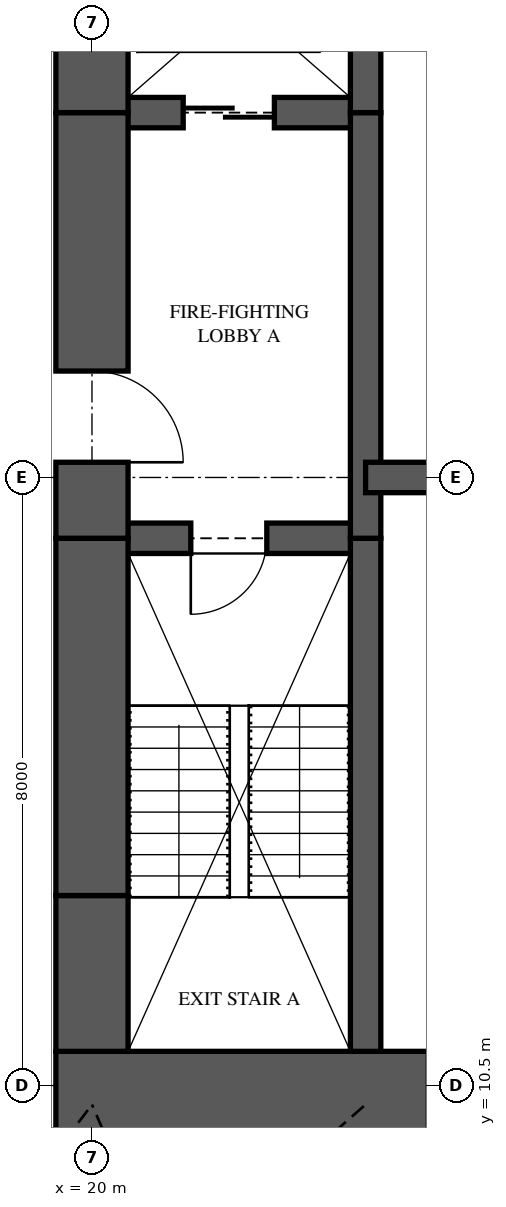
"""IFC4 building model, lengths in metres.
Left out: names, types, materials, properties, quantities, classifications, styles, units other than length and angle.
Written with IfcOpenShell. Run it as: python <this file> out.ifc"""

import sys

from ifc_helpers import new_model, si_unit, direction, frame, frame_2d, origin, place, context, subcontext, project, spatial, rectangle, extrude, element, fill, save


model = new_model("IFC4")
c1 = context("Model", 3, precision=1e-05, world=origin(), true_north=direction((0.0, 1.0)))
c2 = subcontext(c1, "Body", "Model", "MODEL_VIEW")
j1 = project(units=[si_unit("LENGTHUNIT", "METRE"), si_unit("PLANEANGLEUNIT", "RADIAN")], contexts=[c1])
p1 = place(None, origin())
s1 = spatial("IfcSite", under=j1, at=p1, CompositionType="ELEMENT")
p2 = place(p1, origin())
s2 = spatial("IfcBuilding", under=s1, at=p2, CompositionType="ELEMENT")
p3 = place(p2, frame((0.0, 0.0, 71.25)))
s3 = spatial("IfcBuildingStorey", under=s2, at=p3, CompositionType="ELEMENT", Elevation=71.25)
p4 = place(p3, frame((19.525, 10.125, 0.0), z_axis=(0.0, 0.0, 1.0), x_axis=(1.0, 0.0, 0.0)))
e1 = element("IfcWall", 1, at=p4, inside=s3, PredefinedType="SHEAR", context=c2, shape_type="SweptSolid", body=[
    extrude(rectangle(XDim=6.475, YDim=1.65, at=frame_2d((3.238, 0.0))), origin(), (0.0, 0.0, 1.0), 3.5),
])
p5 = place(p4, frame((4.9, 0.0, 0.0)))
e2 = element("IfcOpeningElement", 2, at=p5, cuts=e1, PredefinedType="OPENING", context=c2, shape_type="SweptSolid", body=[
    extrude(rectangle(XDim=0.75, YDim=2.1, at=frame_2d((0.375, 1.05))), frame((0.0, 0.835, 0.0), z_axis=(0.0, -1.0, 0.0), x_axis=(1.0, 0.0, 0.0)), (0.0, 0.0, 1.0), 1.67),
])
p6 = place(p3, frame((20.0, 26.05, 0.0), z_axis=(0.0, 0.0, 1.0), x_axis=(0.0, -1.0, 0.0)))
e3 = element("IfcWall", 3, at=p6, inside=s3, PredefinedType="SHEAR", context=c2, shape_type="SweptSolid", body=[
    extrude(rectangle(XDim=2.75, YDim=0.95, at=frame_2d((1.375, 0.0))), origin(), (0.0, 0.0, 1.0), 3.5),
])
p7 = place(p3, frame((20.0, 23.3, 0.0), z_axis=(0.0, 0.0, 1.0), x_axis=(0.0, -1.0, 0.0)))
e4 = element("IfcWall", 4, at=p7, inside=s3, PredefinedType="SHEAR", context=c2, shape_type="SweptSolid", body=[
    extrude(rectangle(XDim=5.6, YDim=0.95, at=frame_2d((2.8, 0.0))), origin(), (0.0, 0.0, 1.0), 3.5),
])
p8 = place(p7, frame((3.4, 0.0, 0.0)))
e5 = element("IfcOpeningElement", 5, at=p8, cuts=e4, PredefinedType="OPENING", context=c2, shape_type="SweptSolid", body=[
    extrude(rectangle(XDim=1.2, YDim=2.2, at=frame_2d((0.6, 1.1))), frame((0.0, 0.485, 0.0), z_axis=(0.0, -1.0, 0.0), x_axis=(1.0, 0.0, 0.0)), (0.0, 0.0, 1.0), 0.97),
])
p9 = place(p3, frame((20.0, 17.7, 0.0), z_axis=(0.0, 0.0, 1.0), x_axis=(0.0, -1.0, 0.0)))
e6 = element("IfcWall", 6, at=p9, inside=s3, PredefinedType="SHEAR", context=c2, shape_type="SweptSolid", body=[
    extrude(rectangle(XDim=4.7, YDim=0.95, at=frame_2d((2.35, 0.0))), origin(), (0.0, 0.0, 1.0), 3.5),
])
p10 = place(p3, frame((20.0, 13.0, 0.0), z_axis=(0.0, 0.0, 1.0), x_axis=(0.0, -1.0, 0.0)))
e7 = element("IfcWall", 7, at=p10, inside=s3, PredefinedType="SHEAR", context=c2, shape_type="SweptSolid", body=[
    extrude(rectangle(XDim=2.05, YDim=0.95, at=frame_2d((1.025, 0.0))), origin(), (0.0, 0.0, 1.0), 3.5),
])
p11 = place(p3, frame((23.6, 10.95, 0.0), z_axis=(0.0, 0.0, 1.0), x_axis=(0.0, 1.0, 0.0)))
e8 = element("IfcWall", 8, at=p11, inside=s3, PredefinedType="SHEAR", context=c2, shape_type="SweptSolid", body=[
    extrude(rectangle(XDim=6.75, YDim=0.4, at=frame_2d((3.375, 0.0))), origin(), (0.0, 0.0, 1.0), 3.5),
])
p12 = place(p3, frame((23.6, 17.7, 0.0), z_axis=(0.0, 0.0, 1.0), x_axis=(0.0, 1.0, 0.0)))
e9 = element("IfcWall", 9, at=p12, inside=s3, PredefinedType="SHEAR", context=c2, shape_type="SweptSolid", body=[
    extrude(rectangle(XDim=5.6, YDim=0.4, at=frame_2d((2.8, 0.0))), origin(), (0.0, 0.0, 1.0), 3.5),
])
p13 = place(p3, frame((23.6, 23.3, 0.0), z_axis=(0.0, 0.0, 1.0), x_axis=(0.0, 1.0, 0.0)))
e10 = element("IfcWall", 10, at=p13, inside=s3, PredefinedType="SHEAR", context=c2, shape_type="SweptSolid", body=[
    extrude(rectangle(XDim=2.75, YDim=0.4, at=frame_2d((1.375, 0.0))), origin(), (0.0, 0.0, 1.0), 3.5),
])
p14 = place(p3, frame((20.0, 17.7, 0.0), z_axis=(0.0, 0.0, 1.0), x_axis=(1.0, 0.0, 0.0)))
e11 = element("IfcWall", 11, at=p14, inside=s3, PredefinedType="SHEAR", context=c2, shape_type="SweptSolid", body=[
    extrude(rectangle(XDim=3.6, YDim=0.4, at=frame_2d((1.8, 0.0))), origin(), (0.0, 0.0, 1.0), 3.5),
])
p15 = place(p14, frame((1.3, 0.0, 0.0)))
e12 = element("IfcOpeningElement", 12, at=p15, cuts=e11, PredefinedType="OPENING", context=c2, shape_type="SweptSolid", body=[
    extrude(rectangle(XDim=1.0, YDim=2.1, at=frame_2d((0.5, 1.05))), frame((0.0, 0.21, 0.0), z_axis=(0.0, -1.0, 0.0), x_axis=(1.0, 0.0, 0.0)), (0.0, 0.0, 1.0), 0.42),
])
p16 = place(p3, frame((20.0, 23.3, 0.0), z_axis=(0.0, 0.0, 1.0), x_axis=(1.0, 0.0, 0.0)))
e13 = element("IfcWall", 13, at=p16, inside=s3, PredefinedType="SHEAR", context=c2, shape_type="SweptSolid", body=[
    extrude(rectangle(XDim=3.6, YDim=0.4, at=frame_2d((1.8, 0.0))), origin(), (0.0, 0.0, 1.0), 3.5),
])
p17 = place(p16, frame((1.2, 0.0, 0.0)))
e14 = element("IfcOpeningElement", 14, at=p17, cuts=e13, PredefinedType="OPENING", context=c2, shape_type="SweptSolid", body=[
    extrude(rectangle(XDim=1.2, YDim=2.1, at=frame_2d((0.6, 1.05))), frame((0.0, 0.21, 0.0), z_axis=(0.0, -1.0, 0.0), x_axis=(1.0, 0.0, 0.0)), (0.0, 0.0, 1.0), 0.42),
])
p18 = place(p3, frame((23.6, 18.5, 0.0), z_axis=(0.0, 0.0, 1.0), x_axis=(1.0, 0.0, 0.0)))
e15 = element("IfcWall", 15, at=p18, inside=s3, PredefinedType="SHEAR", context=c2, shape_type="SweptSolid", body=[
    extrude(rectangle(XDim=2.4, YDim=0.4, at=frame_2d((1.2, 0.0))), origin(), (0.0, 0.0, 1.0), 3.5),
])
p19 = place(p15, frame((1.0, 0.0, 0.0), z_axis=(0.0, 0.0, 1.0), x_axis=(-1.0, 0.0, 0.0)))
e16 = element("IfcDoor", 16, at=p19, inside=s3, OperationType="SINGLE_SWING_RIGHT", PredefinedType="DOOR", context=c2, shape_type="SweptSolid", body=[
    extrude(rectangle(XDim=1.0, YDim=2.1, at=frame_2d((0.5, 1.05))), frame((0.0, 0.025, 0.0), z_axis=(0.0, -1.0, 0.0), x_axis=(1.0, 0.0, 0.0)), (0.0, 0.0, 1.0), 0.05),
])
fill(e12, e16)
p20 = place(p8, origin())
e17 = element("IfcDoor", 17, at=p20, inside=s3, OperationType="SINGLE_SWING_RIGHT", PredefinedType="DOOR", context=c2, shape_type="SweptSolid", body=[
    extrude(rectangle(XDim=1.2, YDim=2.2, at=frame_2d((0.6, 1.1))), frame((0.0, 0.025, 0.0), z_axis=(0.0, -1.0, 0.0), x_axis=(1.0, 0.0, 0.0)), (0.0, 0.0, 1.0), 0.05),
])
fill(e5, e17)
p21 = place(p17, origin())
e18 = element("IfcDoor", 18, at=p21, inside=s3, OperationType="SLIDING_TO_LEFT", PredefinedType="DOOR", context=c2, shape_type="SweptSolid", body=[
    extrude(rectangle(XDim=1.2, YDim=2.1, at=frame_2d((0.6, 1.05))), frame((0.0, 0.025, 0.0), z_axis=(0.0, -1.0, 0.0), x_axis=(1.0, 0.0, 0.0)), (0.0, 0.0, 1.0), 0.05),
])
fill(e14, e18)
save(model, sys.argv[1])
